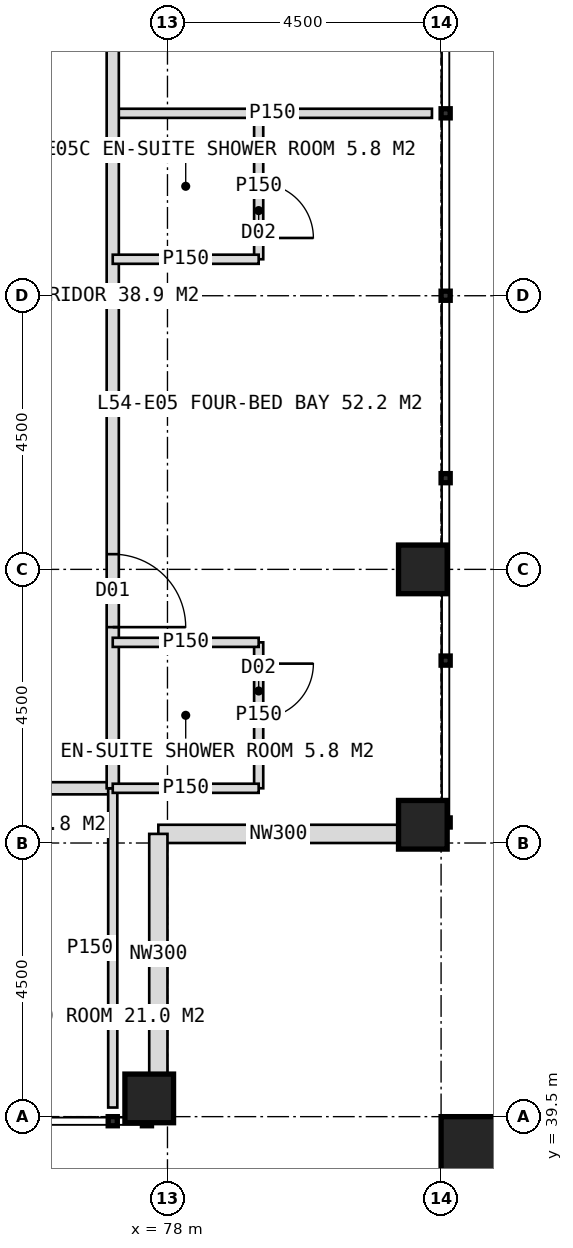
"""IFC4 building model, lengths in metres.
Left out: names, types, materials, properties, quantities, classifications, styles, units other than length and angle.
Written with IfcOpenShell. Run it as: python <this file> out.ifc"""

import sys

from ifc_helpers import new_model, si_unit, direction, frame, frame_2d, origin, origin_2d, place, context, subcontext, project, spatial, rectangle, hollow_rectangle, extrude, element, fill, save


model = new_model("IFC4")
c1 = context("Model", 3, precision=1e-05, world=origin(), true_north=direction((0.0, 1.0)))
c2 = subcontext(c1, "Body", "Model", "MODEL_VIEW")
j1 = project(units=[si_unit("LENGTHUNIT", "METRE"), si_unit("PLANEANGLEUNIT", "RADIAN")], contexts=[c1])
p1 = place(None, origin())
s1 = spatial("IfcSite", under=j1, at=p1, CompositionType="ELEMENT")
p2 = place(p1, origin())
s2 = spatial("IfcBuilding", under=s1, at=p2, CompositionType="ELEMENT")
p3 = place(p2, frame((0.0, 0.0, 225.0)))
s3 = spatial("IfcBuildingStorey", under=s2, at=p3, CompositionType="ELEMENT", Elevation=225.0)
for number, where, z_axis, x_axis in (
    (1, (82.2, 44.3, 0.0), (0.0, 0.0, 1.0), (1.0, 0.0, 0.0)),
    (2, (82.2, 48.5, 0.0), (0.0, 0.0, 1.0), (1.0, 0.0, 0.0)),
    (3, (77.7, 39.8, 0.0), (0.0, 0.0, 1.0), (1.0, 0.0, 0.0)),
):
    element("IfcColumn", number, at=place(p3, frame(where, z_axis=z_axis, x_axis=x_axis)), inside=s3, PredefinedType="COLUMN", context=c2, shape_type="SweptSolid", body=[
        extrude(hollow_rectangle(XDim=0.8, YDim=0.8, WallThickness=0.08, at=origin_2d()), origin(), (0.0, 0.0, 1.0), 4.0),
    ])
p4 = place(p3, frame((83.1, 38.9, 0.0), z_axis=(0.0, 0.0, 1.0), x_axis=(1.0, 0.0, 0.0)))
e4 = element("IfcColumn", 4, at=p4, inside=s3, PredefinedType="COLUMN", context=c2, shape_type="SweptSolid", body=[
    extrude(hollow_rectangle(XDim=1.2, YDim=1.2, WallThickness=0.07, at=origin_2d()), origin(), (0.0, 0.0, 1.0), 4.0),
])
for number, where, z_axis, x_axis in (
    (5, (81.8, 44.15, 0.0), (0.0, 0.0, 1.0), (-1.0, 0.0, 0.0)),
    (6, (77.85, 44.15, 0.0), (0.0, 0.0, 1.0), (0.0, -1.0, 0.0)),
):
    element("IfcWall", number, at=place(p3, frame(where, z_axis=z_axis, x_axis=x_axis)), inside=s3, PredefinedType="ELEMENTEDWALL", context=c2, shape_type="SweptSolid", body=[
        extrude(rectangle(XDim=3.95, YDim=0.3, at=frame_2d((1.975, 0.0))), origin(), (0.0, 0.0, 1.0), 2.85),
    ])
p5 = place(p3, frame((77.1, 44.9, 0.0), z_axis=(0.0, 0.0, 1.0), x_axis=(-1.0, 0.0, 0.0)))
e7 = element("IfcWall", 7, at=p5, inside=s3, PredefinedType="PARTITIONING", context=c2, shape_type="SweptSolid", body=[
    extrude(rectangle(XDim=34.2, YDim=0.2, at=frame_2d((17.1, 0.0))), origin(), (0.0, 0.0, 1.0), 3.75),
])
p6 = place(p5, frame((1.25, 0.0, 0.0)))
e8 = element("IfcOpeningElement", 8, at=p6, cuts=e7, PredefinedType="OPENING", context=c2, shape_type="SweptSolid", body=[
    extrude(rectangle(XDim=1.2, YDim=2.2, at=frame_2d((0.6, 1.1))), frame((0.0, 0.11, 0.0), z_axis=(0.0, -1.0, 0.0), x_axis=(1.0, 0.0, 0.0)), (0.0, 0.0, 1.0), 0.22),
])
p7 = place(p5, frame((7.75, 0.0, 0.0)))
e9 = element("IfcOpeningElement", 9, at=p7, cuts=e7, PredefinedType="OPENING", context=c2, shape_type="SweptSolid", body=[
    extrude(rectangle(XDim=1.2, YDim=2.2, at=frame_2d((0.6, 1.1))), frame((0.0, 0.11, 0.0), z_axis=(0.0, -1.0, 0.0), x_axis=(1.0, 0.0, 0.0)), (0.0, 0.0, 1.0), 0.22),
])
p8 = place(p5, frame((13.25, 0.0, 0.0)))
e10 = element("IfcOpeningElement", 10, at=p8, cuts=e7, PredefinedType="OPENING", context=c2, shape_type="SweptSolid", body=[
    extrude(rectangle(XDim=1.2, YDim=2.2, at=frame_2d((0.6, 1.1))), frame((0.0, 0.11, 0.0), z_axis=(0.0, -1.0, 0.0), x_axis=(1.0, 0.0, 0.0)), (0.0, 0.0, 1.0), 0.22),
])
p9 = place(p5, frame((19.75, 0.0, 0.0)))
e11 = element("IfcOpeningElement", 11, at=p9, cuts=e7, PredefinedType="OPENING", context=c2, shape_type="SweptSolid", body=[
    extrude(rectangle(XDim=1.2, YDim=2.2, at=frame_2d((0.6, 1.1))), frame((0.0, 0.11, 0.0), z_axis=(0.0, -1.0, 0.0), x_axis=(1.0, 0.0, 0.0)), (0.0, 0.0, 1.0), 0.22),
])
p10 = place(p5, frame((30.35, 0.0, 0.0)))
e12 = element("IfcOpeningElement", 12, at=p10, cuts=e7, PredefinedType="OPENING", context=c2, shape_type="SweptSolid", body=[
    extrude(rectangle(XDim=1.2, YDim=2.2, at=frame_2d((0.6, 1.1))), frame((0.0, 0.11, 0.0), z_axis=(0.0, -1.0, 0.0), x_axis=(1.0, 0.0, 0.0)), (0.0, 0.0, 1.0), 0.22),
])
for number, where, z_axis, x_axis in (
    (13, (77.1, 44.9, 0.0), (0.0, 0.0, 1.0), (0.0, -1.0, 0.0)),
    (14, (77.1, 56.0, 0.0), (0.0, 0.0, 1.0), (1.0, 0.0, 0.0)),
):
    element("IfcWall", number, at=place(p3, frame(where, z_axis=z_axis, x_axis=x_axis)), inside=s3, PredefinedType="PARTITIONING", context=c2, shape_type="SweptSolid", body=[
        extrude(rectangle(XDim=5.25, YDim=0.15, at=frame_2d((2.625, 0.0))), origin(), (0.0, 0.0, 1.0), 3.75),
    ])
p11 = place(p3, frame((77.1, 79.1, 0.0), z_axis=(0.0, 0.0, 1.0), x_axis=(0.0, -1.0, 0.0)))
e15 = element("IfcWall", 15, at=p11, inside=s3, PredefinedType="PARTITIONING", context=c2, shape_type="SweptSolid", body=[
    extrude(rectangle(XDim=34.2, YDim=0.2, at=frame_2d((17.1, 0.0))), origin(), (0.0, 0.0, 1.0), 3.75),
])
p12 = place(p11, frame((3.65, 0.0, 0.0)))
e16 = element("IfcOpeningElement", 16, at=p12, cuts=e15, PredefinedType="OPENING", context=c2, shape_type="SweptSolid", body=[
    extrude(rectangle(XDim=1.2, YDim=2.2, at=frame_2d((0.6, 1.1))), frame((0.0, 0.11, 0.0), z_axis=(0.0, -1.0, 0.0), x_axis=(1.0, 0.0, 0.0)), (0.0, 0.0, 1.0), 0.22),
])
p13 = place(p11, frame((10.75, 0.0, 0.0)))
e17 = element("IfcOpeningElement", 17, at=p13, cuts=e15, PredefinedType="OPENING", context=c2, shape_type="SweptSolid", body=[
    extrude(rectangle(XDim=1.2, YDim=2.2, at=frame_2d((0.6, 1.1))), frame((0.0, 0.11, 0.0), z_axis=(0.0, -1.0, 0.0), x_axis=(1.0, 0.0, 0.0)), (0.0, 0.0, 1.0), 0.22),
])
p14 = place(p11, frame((15.1, 0.0, 0.0)))
e18 = element("IfcOpeningElement", 18, at=p14, cuts=e15, PredefinedType="OPENING", context=c2, shape_type="SweptSolid", body=[
    extrude(rectangle(XDim=1.0, YDim=2.1, at=frame_2d((0.5, 1.05))), frame((0.0, 0.11, 0.0), z_axis=(0.0, -1.0, 0.0), x_axis=(1.0, 0.0, 0.0)), (0.0, 0.0, 1.0), 0.22),
])
p15 = place(p11, frame((19.75, 0.0, 0.0)))
e19 = element("IfcOpeningElement", 19, at=p15, cuts=e15, PredefinedType="OPENING", context=c2, shape_type="SweptSolid", body=[
    extrude(rectangle(XDim=1.2, YDim=2.2, at=frame_2d((0.6, 1.1))), frame((0.0, 0.11, 0.0), z_axis=(0.0, -1.0, 0.0), x_axis=(1.0, 0.0, 0.0)), (0.0, 0.0, 1.0), 0.22),
])
p16 = place(p11, frame((30.35, 0.0, 0.0)))
e20 = element("IfcOpeningElement", 20, at=p16, cuts=e15, PredefinedType="OPENING", context=c2, shape_type="SweptSolid", body=[
    extrude(rectangle(XDim=1.2, YDim=2.2, at=frame_2d((0.6, 1.1))), frame((0.0, 0.11, 0.0), z_axis=(0.0, -1.0, 0.0), x_axis=(1.0, 0.0, 0.0)), (0.0, 0.0, 1.0), 0.22),
])
p17 = place(p3, frame((79.5, 47.3, 0.0), z_axis=(0.0, 0.0, 1.0), x_axis=(0.0, -1.0, 0.0)))
e21 = element("IfcWall", 21, at=p17, inside=s3, PredefinedType="PARTITIONING", context=c2, shape_type="SweptSolid", body=[
    extrude(rectangle(XDim=2.4, YDim=0.15, at=frame_2d((1.2, 0.0))), origin(), (0.0, 0.0, 1.0), 3.75),
])
p18 = place(p17, frame((0.35, 0.0, 0.0)))
e22 = element("IfcOpeningElement", 22, at=p18, cuts=e21, PredefinedType="OPENING", context=c2, shape_type="SweptSolid", body=[
    extrude(rectangle(XDim=0.9, YDim=2.1, at=frame_2d((0.45, 1.05))), frame((0.0, 0.085, 0.0), z_axis=(0.0, -1.0, 0.0), x_axis=(1.0, 0.0, 0.0)), (0.0, 0.0, 1.0), 0.17),
])
p19 = place(p3, frame((77.1, 47.3, 0.0), z_axis=(0.0, 0.0, 1.0), x_axis=(1.0, 0.0, 0.0)))
e23 = element("IfcWall", 23, at=p19, inside=s3, PredefinedType="PARTITIONING", context=c2, shape_type="SweptSolid", body=[
    extrude(rectangle(XDim=2.4, YDim=0.15, at=frame_2d((1.2, 0.0))), origin(), (0.0, 0.0, 1.0), 3.75),
])
p20 = place(p3, frame((79.5, 56.0, 0.0), z_axis=(0.0, 0.0, 1.0), x_axis=(0.0, -1.0, 0.0)))
e24 = element("IfcWall", 24, at=p20, inside=s3, PredefinedType="PARTITIONING", context=c2, shape_type="SweptSolid", body=[
    extrude(rectangle(XDim=2.4, YDim=0.15, at=frame_2d((1.2, 0.0))), origin(), (0.0, 0.0, 1.0), 3.75),
])
p21 = place(p20, frame((1.15, 0.0, 0.0)))
e25 = element("IfcOpeningElement", 25, at=p21, cuts=e24, PredefinedType="OPENING", context=c2, shape_type="SweptSolid", body=[
    extrude(rectangle(XDim=0.9, YDim=2.1, at=frame_2d((0.45, 1.05))), frame((0.0, 0.085, 0.0), z_axis=(0.0, -1.0, 0.0), x_axis=(1.0, 0.0, 0.0)), (0.0, 0.0, 1.0), 0.17),
])
for number, where, z_axis, x_axis in (
    (26, (77.1, 53.6, 0.0), (0.0, 0.0, 1.0), (1.0, 0.0, 0.0)),
    (27, (77.1, 44.9, 0.0), (0.0, 0.0, 1.0), (1.0, 0.0, 0.0)),
):
    element("IfcWall", number, at=place(p3, frame(where, z_axis=z_axis, x_axis=x_axis)), inside=s3, PredefinedType="PARTITIONING", context=c2, shape_type="SweptSolid", body=[
        extrude(rectangle(XDim=2.4, YDim=0.15, at=frame_2d((1.2, 0.0))), origin(), (0.0, 0.0, 1.0), 3.75),
    ])
p22 = place(p16, origin())
e28 = element("IfcDoor", 28, at=p22, inside=s3, OperationType="SINGLE_SWING_RIGHT", PredefinedType="DOOR", context=c2, shape_type="SweptSolid", body=[
    extrude(rectangle(XDim=1.2, YDim=2.2, at=frame_2d((0.6, 1.1))), frame((0.0, 0.025, 0.0), z_axis=(0.0, -1.0, 0.0), x_axis=(1.0, 0.0, 0.0)), (0.0, 0.0, 1.0), 0.05),
])
fill(e20, e28)
p23 = place(p18, origin())
e29 = element("IfcDoor", 29, at=p23, inside=s3, OperationType="SINGLE_SWING_LEFT", PredefinedType="DOOR", context=c2, shape_type="SweptSolid", body=[
    extrude(rectangle(XDim=0.9, YDim=2.1, at=frame_2d((0.45, 1.05))), frame((0.0, 0.025, 0.0), z_axis=(0.0, -1.0, 0.0), x_axis=(1.0, 0.0, 0.0)), (0.0, 0.0, 1.0), 0.05),
])
fill(e22, e29)
p24 = place(p21, origin())
e30 = element("IfcDoor", 30, at=p24, inside=s3, OperationType="SINGLE_SWING_RIGHT", PredefinedType="DOOR", context=c2, shape_type="SweptSolid", body=[
    extrude(rectangle(XDim=0.9, YDim=2.1, at=frame_2d((0.45, 1.05))), frame((0.0, 0.025, 0.0), z_axis=(0.0, -1.0, 0.0), x_axis=(1.0, 0.0, 0.0)), (0.0, 0.0, 1.0), 0.05),
])
fill(e25, e30)
save(model, sys.argv[1])
